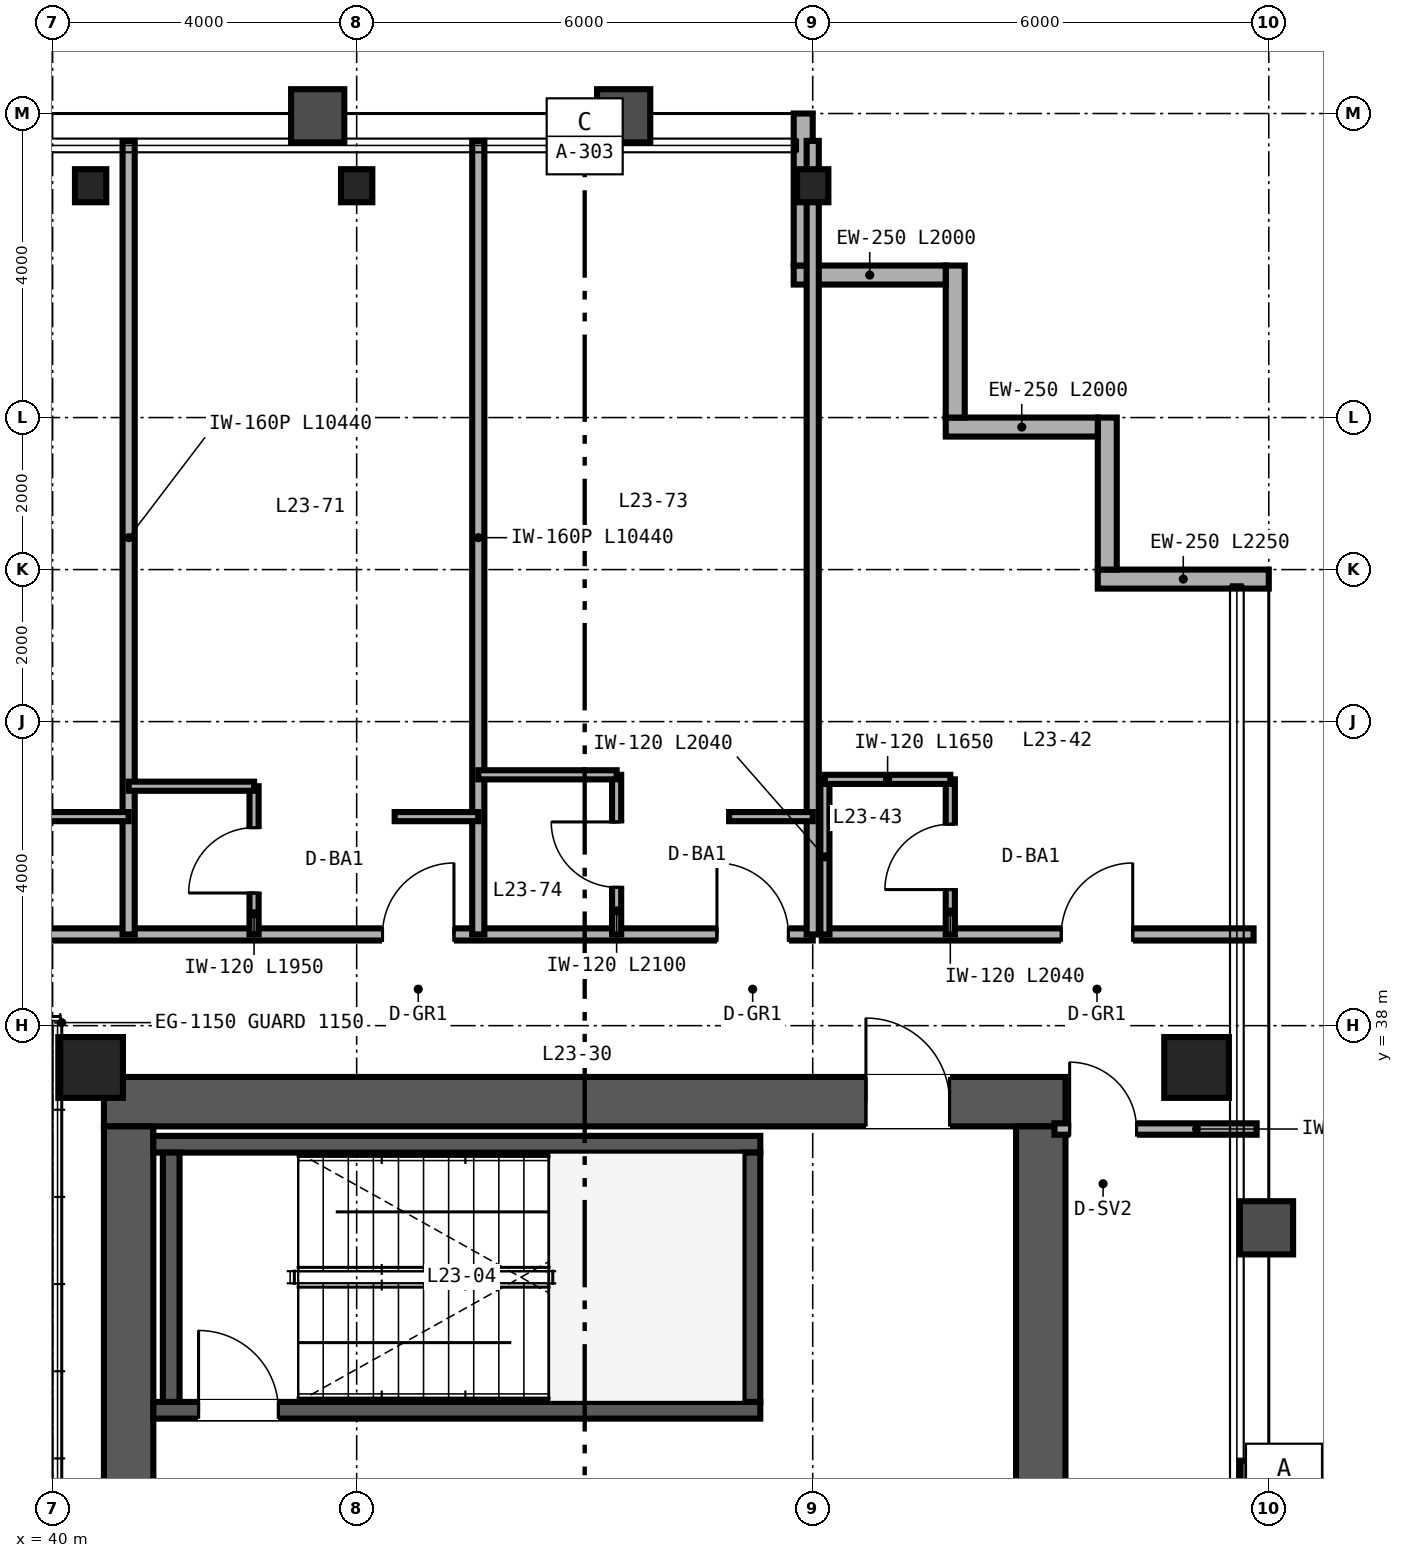
"""IFC4 building model, lengths in metres.
Left out: names, types, materials, properties, quantities, classifications, styles, units other than length and angle.
Written with IfcOpenShell. Run it as: python <this file> out.ifc"""

import sys

from ifc_helpers import new_model, si_unit, direction, frame, frame_2d, origin, origin_2d, place, context, subcontext, project, spatial, rectangle, hollow_rectangle, i_section, extrude, source, transform, mapped, element, fill, save


model = new_model("IFC4")
c1 = context("Model", 3, precision=1e-05, world=origin(), true_north=direction((0.0, 1.0)))
c2 = subcontext(c1, "Body", "Model", "MODEL_VIEW")
j1 = project(units=[si_unit("LENGTHUNIT", "METRE"), si_unit("PLANEANGLEUNIT", "RADIAN")], contexts=[c1])
p1 = place(None, origin())
s1 = spatial("IfcSite", under=j1, at=p1, CompositionType="ELEMENT")
p2 = place(p1, origin())
s2 = spatial("IfcBuilding", under=s1, at=p2, CompositionType="ELEMENT")
p3 = place(p2, frame((0.0, 0.0, 97.2)))
s3 = spatial("IfcBuildingStorey", under=s2, at=p3, CompositionType="ELEMENT", Elevation=97.2)
p4 = place(p3, frame((40.675, 37.0, 0.0), z_axis=(0.0, 0.0, 1.0), x_axis=(1.0, 0.0, 0.0)))
e1 = element("IfcWall", 1, at=p4, inside=s3, PredefinedType="SHEAR", context=c2, shape_type="SweptSolid", body=[
    extrude(rectangle(XDim=12.65, YDim=0.65, at=frame_2d((6.325, 0.0))), origin(), (0.0, 0.0, 1.0), 3.36),
])
p5 = place(p4, frame((10.025, 0.0, 0.0)))
e2 = element("IfcOpeningElement", 2, at=p5, cuts=e1, PredefinedType="OPENING", context=c2, shape_type="SweptSolid", body=[
    extrude(rectangle(XDim=1.1, YDim=2.15, at=frame_2d((0.55, 1.075))), frame((0.0, 0.335, 0.0), z_axis=(0.0, -1.0, 0.0), x_axis=(1.0, 0.0, 0.0)), (0.0, 0.0, 1.0), 0.67),
])
for number, where, z_axis, x_axis in (
    (3, (41.0, 15.325, 0.0), (0.0, 0.0, 1.0), (0.0, 1.0, 0.0)),
    (4, (53.0, 15.325, 0.0), (0.0, 0.0, 1.0), (0.0, 1.0, 0.0)),
):
    element("IfcWall", number, at=place(p3, frame(where, z_axis=z_axis, x_axis=x_axis)), inside=s3, PredefinedType="SHEAR", context=c2, shape_type="SweptSolid", body=[
        extrude(rectangle(XDim=21.35, YDim=0.65, at=frame_2d((10.675, 0.0))), origin(), (0.0, 0.0, 1.0), 3.36),
    ])
p6 = place(p3, frame((41.325, 32.94, 0.0), z_axis=(0.0, 0.0, 1.0), x_axis=(1.0, 0.0, 0.0)))
e5 = element("IfcWall", 5, at=p6, inside=s3, PredefinedType="SHEAR", context=c2, shape_type="SweptSolid", body=[
    extrude(rectangle(XDim=7.985, YDim=0.22, at=frame_2d((3.993, 0.0))), origin(), (0.0, 0.0, 1.0), 3.4),
])
p7 = place(p6, frame((0.595, 0.0, 0.0)))
e6 = element("IfcOpeningElement", 6, at=p7, cuts=e5, PredefinedType="OPENING", context=c2, shape_type="SweptSolid", body=[
    extrude(rectangle(XDim=1.05, YDim=2.15, at=frame_2d((0.525, 1.075))), frame((0.0, 0.12, 0.0), z_axis=(0.0, -1.0, 0.0), x_axis=(1.0, 0.0, 0.0)), (0.0, 0.0, 1.0), 0.24),
])
p8 = place(p3, frame((41.325, 36.44, 0.0), z_axis=(0.0, 0.0, 1.0), x_axis=(1.0, 0.0, 0.0)))
e7 = element("IfcWall", 7, at=p8, inside=s3, PredefinedType="SHEAR", context=c2, shape_type="SweptSolid", body=[
    extrude(rectangle(XDim=7.985, YDim=0.22, at=frame_2d((3.993, 0.0))), origin(), (0.0, 0.0, 1.0), 3.4),
])
for number, where, z_axis, x_axis in (
    (8, (41.56, 33.05, 0.0), (0.0, 0.0, 1.0), (0.0, 1.0, 0.0)),
    (9, (49.2, 33.05, 0.0), (0.0, 0.0, 1.0), (0.0, 1.0, 0.0)),
):
    element("IfcWall", number, at=place(p3, frame(where, z_axis=z_axis, x_axis=x_axis)), inside=s3, PredefinedType="SHEAR", context=c2, shape_type="SweptSolid", body=[
        extrude(rectangle(XDim=3.28, YDim=0.22, at=frame_2d((1.64, 0.0))), origin(), (0.0, 0.0, 1.0), 3.4),
    ])
m1 = source(origin(), c2, "Body", "SweptSolid", [
    extrude(hollow_rectangle(XDim=0.85, YDim=0.8, WallThickness=0.032, at=origin_2d()), origin(), (0.0, 0.0, 1.0), 3.36),
])
for number, where, z_axis, x_axis in (
    (10, (40.5, 37.45, 0.0), (0.0, 0.0, 1.0), (1.0, 0.0, 0.0)),
    (11, (55.05, 37.45, 0.0), (0.0, 0.0, 1.0), (1.0, 0.0, 0.0)),
):
    element("IfcColumn", number, at=place(p3, frame(where, z_axis=z_axis, x_axis=x_axis)), inside=s3, PredefinedType="COLUMN", context=c2, shape_type="MappedRepresentation", body=[
        mapped(m1, transform((0.0, 0.0, 0.0), scale=1.0)),
    ])
m2 = source(origin(), c2, "Body", "SweptSolid", [
    extrude(i_section(OverallWidth=0.412, OverallDepth=0.435, WebThickness=0.036, FlangeThickness=0.057, FilletRadius=0.025, at=origin_2d()), origin(), (0.0, 0.0, 1.0), 3.36),
])
for number, where, z_axis, x_axis in (
    (12, (40.5, 49.05, 0.0), (0.0, 0.0, 1.0), (1.0, 0.0, 0.0)),
    (13, (44.0, 49.05, 0.0), (0.0, 0.0, 1.0), (1.0, 0.0, 0.0)),
    (14, (50.0, 49.05, 0.0), (0.0, 0.0, 1.0), (1.0, 0.0, 0.0)),
):
    element("IfcColumn", number, at=place(p3, frame(where, z_axis=z_axis, x_axis=x_axis)), inside=s3, PredefinedType="COLUMN", context=c2, shape_type="MappedRepresentation", body=[
        mapped(m2, transform((0.0, 0.0, 0.0), scale=1.0)),
    ])
p9 = place(p3, frame((56.0, 43.875, 0.0), z_axis=(0.0, 0.0, 1.0), x_axis=(-1.0, 0.0, 0.0)))
e15 = element("IfcWall", 15, at=p9, inside=s3, PredefinedType="SOLIDWALL", context=c2, shape_type="SweptSolid", body=[
    extrude(rectangle(XDim=2.25, YDim=0.25, at=frame_2d((1.125, 0.0))), origin(), (0.0, 0.0, 1.0), 3.36),
])
for number, where, z_axis, x_axis in (
    (16, (53.875, 44.0, 0.0), (0.0, 0.0, 1.0), (0.0, 1.0, 0.0)),
    (17, (53.75, 45.875, 0.0), (0.0, 0.0, 1.0), (-1.0, 0.0, 0.0)),
    (18, (51.875, 46.0, 0.0), (0.0, 0.0, 1.0), (0.0, 1.0, 0.0)),
    (19, (51.75, 47.875, 0.0), (0.0, 0.0, 1.0), (-1.0, 0.0, 0.0)),
):
    element("IfcWall", number, at=place(p3, frame(where, z_axis=z_axis, x_axis=x_axis)), inside=s3, PredefinedType="SOLIDWALL", context=c2, shape_type="SweptSolid", body=[
        extrude(rectangle(XDim=2.0, YDim=0.25, at=frame_2d((1.0, 0.0))), origin(), (0.0, 0.0, 1.0), 3.36),
    ])
p10 = place(p3, frame((49.875, 48.0, 0.0), z_axis=(0.0, 0.0, 1.0), x_axis=(0.0, 1.0, 0.0)))
e20 = element("IfcWall", 20, at=p10, inside=s3, PredefinedType="SOLIDWALL", context=c2, shape_type="SweptSolid", body=[
    extrude(rectangle(XDim=2.0, YDim=0.25, at=frame_2d((1.0, 0.0))), origin(), (0.0, 0.0, 1.0), 2.667),
])
p11 = place(p3, frame((53.18, 36.64, 0.0), z_axis=(0.0, 0.0, 1.0), x_axis=(1.0, 0.0, 0.0)))
e21 = element("IfcWall", 21, at=p11, inside=s3, PredefinedType="PARTITIONING", context=c2, shape_type="SweptSolid", body=[
    extrude(rectangle(XDim=2.66, YDim=0.15, at=frame_2d((1.33, 0.0))), origin(), (0.0, 0.0, 1.0), 2.743),
])
p12 = place(p11, frame((0.2, 0.0, 0.0)))
e22 = element("IfcOpeningElement", 22, at=p12, cuts=e21, PredefinedType="OPENING", context=c2, shape_type="SweptSolid", body=[
    extrude(rectangle(XDim=0.88, YDim=2.15, at=frame_2d((0.44, 1.075))), frame((0.0, 0.085, 0.0), z_axis=(0.0, -1.0, 0.0), x_axis=(1.0, 0.0, 0.0)), (0.0, 0.0, 1.0), 0.17),
])
p13 = place(p3, frame((50.12, 39.2, 0.0), z_axis=(0.0, 0.0, 1.0), x_axis=(1.0, 0.0, 0.0)))
e23 = element("IfcWall", 23, at=p13, inside=s3, PredefinedType="PARTITIONING", context=c2, shape_type="SweptSolid", body=[
    extrude(rectangle(XDim=5.68, YDim=0.16, at=frame_2d((2.84, 0.0))), origin(), (0.0, 0.0, 1.0), 3.36),
])
p14 = place(p13, frame((3.15, 0.0, 0.0)))
e24 = element("IfcOpeningElement", 24, at=p14, cuts=e23, PredefinedType="OPENING", context=c2, shape_type="SweptSolid", body=[
    extrude(rectangle(XDim=0.94, YDim=2.15, at=frame_2d((0.47, 1.075))), frame((0.0, 0.09, 0.0), z_axis=(0.0, -1.0, 0.0), x_axis=(1.0, 0.0, 0.0)), (0.0, 0.0, 1.0), 0.18),
])
p15 = place(p3, frame((51.81, 39.2, 0.0), z_axis=(0.0, 0.0, 1.0), x_axis=(0.0, 1.0, 0.0)))
e25 = element("IfcWall", 25, at=p15, inside=s3, PredefinedType="PARTITIONING", context=c2, shape_type="SweptSolid", body=[
    extrude(rectangle(XDim=2.04, YDim=0.12, at=frame_2d((1.02, 0.0))), origin(), (0.0, 0.0, 1.0), 3.36),
])
p16 = place(p15, frame((0.59, 0.0, 0.0)))
e26 = element("IfcOpeningElement", 26, at=p16, cuts=e25, PredefinedType="OPENING", context=c2, shape_type="SweptSolid", body=[
    extrude(rectangle(XDim=0.86, YDim=2.1, at=frame_2d((0.43, 1.05))), frame((0.0, 0.07, 0.0), z_axis=(0.0, -1.0, 0.0), x_axis=(1.0, 0.0, 0.0)), (0.0, 0.0, 1.0), 0.14),
])
p17 = place(p3, frame((50.16, 39.2, 0.0), z_axis=(0.0, 0.0, 1.0), x_axis=(0.0, 1.0, 0.0)))
e27 = element("IfcWall", 27, at=p17, inside=s3, PredefinedType="PARTITIONING", context=c2, shape_type="SweptSolid", body=[
    extrude(rectangle(XDim=2.04, YDim=0.12, at=frame_2d((1.02, 0.0))), origin(), (0.0, 0.0, 1.0), 3.36),
])
p18 = place(p3, frame((50.16, 41.24, 0.0), z_axis=(0.0, 0.0, 1.0), x_axis=(1.0, 0.0, 0.0)))
e28 = element("IfcWall", 28, at=p18, inside=s3, PredefinedType="PARTITIONING", context=c2, shape_type="SweptSolid", body=[
    extrude(rectangle(XDim=1.65, YDim=0.12, at=frame_2d((0.825, 0.0))), origin(), (0.0, 0.0, 1.0), 3.36),
])
p19 = place(p3, frame((14.0, 39.2, 0.0), z_axis=(0.0, 0.0, 1.0), x_axis=(1.0, 0.0, 0.0)))
e29 = element("IfcWall", 29, at=p19, inside=s3, PredefinedType="PARTITIONING", context=c2, shape_type="SweptSolid", body=[
    extrude(rectangle(XDim=36.0, YDim=0.16, at=frame_2d((18.0, 0.0))), origin(), (0.0, 0.0, 1.0), 2.581),
])
p20 = place(p19, frame((3.94, 0.0, 0.0)))
e30 = element("IfcOpeningElement", 30, at=p20, cuts=e29, PredefinedType="OPENING", context=c2, shape_type="SweptSolid", body=[
    extrude(rectangle(XDim=0.94, YDim=2.15, at=frame_2d((0.47, 1.075))), frame((0.0, 0.09, 0.0), z_axis=(0.0, -1.0, 0.0), x_axis=(1.0, 0.0, 0.0)), (0.0, 0.0, 1.0), 0.18),
])
p21 = place(p19, frame((7.89, 0.0, 0.0)))
e31 = element("IfcOpeningElement", 31, at=p21, cuts=e29, PredefinedType="OPENING", context=c2, shape_type="SweptSolid", body=[
    extrude(rectangle(XDim=0.94, YDim=2.15, at=frame_2d((0.47, 1.075))), frame((0.0, 0.09, 0.0), z_axis=(0.0, -1.0, 0.0), x_axis=(1.0, 0.0, 0.0)), (0.0, 0.0, 1.0), 0.18),
])
p22 = place(p19, frame((14.94, 0.0, 0.0)))
e32 = element("IfcOpeningElement", 32, at=p22, cuts=e29, PredefinedType="OPENING", context=c2, shape_type="SweptSolid", body=[
    extrude(rectangle(XDim=0.94, YDim=2.15, at=frame_2d((0.47, 1.075))), frame((0.0, 0.09, 0.0), z_axis=(0.0, -1.0, 0.0), x_axis=(1.0, 0.0, 0.0)), (0.0, 0.0, 1.0), 0.18),
])
p23 = place(p19, frame((18.72, 0.0, 0.0)))
e33 = element("IfcOpeningElement", 33, at=p23, cuts=e29, PredefinedType="OPENING", context=c2, shape_type="SweptSolid", body=[
    extrude(rectangle(XDim=0.96, YDim=2.15, at=frame_2d((0.48, 1.075))), frame((0.0, 0.09, 0.0), z_axis=(0.0, -1.0, 0.0), x_axis=(1.0, 0.0, 0.0)), (0.0, 0.0, 1.0), 0.18),
])
p24 = place(p19, frame((24.79, 0.0, 0.0)))
e34 = element("IfcOpeningElement", 34, at=p24, cuts=e29, PredefinedType="OPENING", context=c2, shape_type="SweptSolid", body=[
    extrude(rectangle(XDim=0.94, YDim=2.15, at=frame_2d((0.47, 1.075))), frame((0.0, 0.09, 0.0), z_axis=(0.0, -1.0, 0.0), x_axis=(1.0, 0.0, 0.0)), (0.0, 0.0, 1.0), 0.18),
])
p25 = place(p19, frame((30.34, 0.0, 0.0)))
e35 = element("IfcOpeningElement", 35, at=p25, cuts=e29, PredefinedType="OPENING", context=c2, shape_type="SweptSolid", body=[
    extrude(rectangle(XDim=0.94, YDim=2.15, at=frame_2d((0.47, 1.075))), frame((0.0, 0.09, 0.0), z_axis=(0.0, -1.0, 0.0), x_axis=(1.0, 0.0, 0.0)), (0.0, 0.0, 1.0), 0.18),
])
p26 = place(p19, frame((34.74, 0.0, 0.0)))
e36 = element("IfcOpeningElement", 36, at=p26, cuts=e29, PredefinedType="OPENING", context=c2, shape_type="SweptSolid", body=[
    extrude(rectangle(XDim=0.94, YDim=2.15, at=frame_2d((0.47, 1.075))), frame((0.0, 0.09, 0.0), z_axis=(0.0, -1.0, 0.0), x_axis=(1.0, 0.0, 0.0)), (0.0, 0.0, 1.0), 0.18),
])
p27 = place(p3, frame((50.0, 39.2, 0.0), z_axis=(0.0, 0.0, 1.0), x_axis=(0.0, 1.0, 0.0)))
e37 = element("IfcWall", 37, at=p27, inside=s3, PredefinedType="PARTITIONING", context=c2, shape_type="SweptSolid", body=[
    extrude(rectangle(XDim=10.44, YDim=0.16, at=frame_2d((5.22, 0.0))), origin(), (0.0, 0.0, 1.0), 2.667),
])
p28 = place(p3, frame((41.0, 39.2, 0.0), z_axis=(0.0, 0.0, 1.0), x_axis=(0.0, 1.0, 0.0)))
e38 = element("IfcWall", 38, at=p28, inside=s3, PredefinedType="PARTITIONING", context=c2, shape_type="SweptSolid", body=[
    extrude(rectangle(XDim=10.44, YDim=0.16, at=frame_2d((5.22, 0.0))), origin(), (0.0, 0.0, 1.0), 2.823),
])
p29 = place(p3, frame((39.9, 40.75, 0.0), z_axis=(0.0, 0.0, 1.0), x_axis=(1.0, 0.0, 0.0)))
e39 = element("IfcWall", 39, at=p29, inside=s3, PredefinedType="PARTITIONING", context=c2, shape_type="SweptSolid", body=[
    extrude(rectangle(XDim=1.1, YDim=0.12, at=frame_2d((0.55, 0.0))), origin(), (0.0, 0.0, 1.0), 2.581),
])
p30 = place(p3, frame((45.6, 39.2, 0.0), z_axis=(0.0, 0.0, 1.0), x_axis=(0.0, 1.0, 0.0)))
e40 = element("IfcWall", 40, at=p30, inside=s3, PredefinedType="PARTITIONING", context=c2, shape_type="SweptSolid", body=[
    extrude(rectangle(XDim=10.44, YDim=0.16, at=frame_2d((5.22, 0.0))), origin(), (0.0, 0.0, 1.0), 2.667),
])
p31 = place(p3, frame((42.65, 39.2, 0.0), z_axis=(0.0, 0.0, 1.0), x_axis=(0.0, 1.0, 0.0)))
e41 = element("IfcWall", 41, at=p31, inside=s3, PredefinedType="PARTITIONING", context=c2, shape_type="SweptSolid", body=[
    extrude(rectangle(XDim=1.95, YDim=0.12, at=frame_2d((0.975, 0.0))), origin(), (0.0, 0.0, 1.0), 3.36),
])
p32 = place(p31, frame((0.545, 0.0, 0.0)))
e42 = element("IfcOpeningElement", 42, at=p32, cuts=e41, PredefinedType="OPENING", context=c2, shape_type="SweptSolid", body=[
    extrude(rectangle(XDim=0.86, YDim=2.1, at=frame_2d((0.43, 1.05))), frame((0.0, 0.07, 0.0), z_axis=(0.0, -1.0, 0.0), x_axis=(1.0, 0.0, 0.0)), (0.0, 0.0, 1.0), 0.14),
])
p33 = place(p3, frame((41.0, 41.15, 0.0), z_axis=(0.0, 0.0, 1.0), x_axis=(1.0, 0.0, 0.0)))
e43 = element("IfcWall", 43, at=p33, inside=s3, PredefinedType="PARTITIONING", context=c2, shape_type="SweptSolid", body=[
    extrude(rectangle(XDim=1.65, YDim=0.12, at=frame_2d((0.825, 0.0))), origin(), (0.0, 0.0, 1.0), 3.36),
])
p34 = place(p3, frame((44.5, 40.75, 0.0), z_axis=(0.0, 0.0, 1.0), x_axis=(1.0, 0.0, 0.0)))
e44 = element("IfcWall", 44, at=p34, inside=s3, PredefinedType="PARTITIONING", context=c2, shape_type="SweptSolid", body=[
    extrude(rectangle(XDim=1.1, YDim=0.12, at=frame_2d((0.55, 0.0))), origin(), (0.0, 0.0, 1.0), 3.36),
])
p35 = place(p3, frame((47.42, 39.2, 0.0), z_axis=(0.0, 0.0, 1.0), x_axis=(0.0, 1.0, 0.0)))
e45 = element("IfcWall", 45, at=p35, inside=s3, PredefinedType="PARTITIONING", context=c2, shape_type="SweptSolid", body=[
    extrude(rectangle(XDim=2.1, YDim=0.12, at=frame_2d((1.05, 0.0))), origin(), (0.0, 0.0, 1.0), 3.36),
])
p36 = place(p35, frame((0.62, 0.0, 0.0)))
e46 = element("IfcOpeningElement", 46, at=p36, cuts=e45, PredefinedType="OPENING", context=c2, shape_type="SweptSolid", body=[
    extrude(rectangle(XDim=0.86, YDim=2.1, at=frame_2d((0.43, 1.05))), frame((0.0, 0.07, 0.0), z_axis=(0.0, -1.0, 0.0), x_axis=(1.0, 0.0, 0.0)), (0.0, 0.0, 1.0), 0.14),
])
p37 = place(p3, frame((45.6, 41.3, 0.0), z_axis=(0.0, 0.0, 1.0), x_axis=(1.0, 0.0, 0.0)))
e47 = element("IfcWall", 47, at=p37, inside=s3, PredefinedType="PARTITIONING", context=c2, shape_type="SweptSolid", body=[
    extrude(rectangle(XDim=1.82, YDim=0.12, at=frame_2d((0.91, 0.0))), origin(), (0.0, 0.0, 1.0), 3.36),
])
p38 = place(p3, frame((48.9, 40.75, 0.0), z_axis=(0.0, 0.0, 1.0), x_axis=(1.0, 0.0, 0.0)))
e48 = element("IfcWall", 48, at=p38, inside=s3, PredefinedType="PARTITIONING", context=c2, shape_type="SweptSolid", body=[
    extrude(rectangle(XDim=1.1, YDim=0.12, at=frame_2d((0.55, 0.0))), origin(), (0.0, 0.0, 1.0), 3.36),
])
m3 = source(origin(), c2, "Body", "SweptSolid", [
    extrude(rectangle(XDim=1.05, YDim=2.15, at=frame_2d((0.525, 1.075))), frame((0.0, 0.025, 0.0), z_axis=(0.0, -1.0, 0.0), x_axis=(1.0, 0.0, 0.0)), (0.0, 0.0, 1.0), 0.05),
])
p39 = place(p7, origin())
e49 = element("IfcDoor", 49, at=p39, inside=s3, OperationType="SINGLE_SWING_LEFT", PredefinedType="DOOR", context=c2, shape_type="MappedRepresentation", body=[
    mapped(m3, transform((0.0, 0.0, 0.0), scale=1.0)),
])
fill(e6, e49)
m4 = source(origin(), c2, "Body", "SweptSolid", [
    extrude(rectangle(XDim=1.1, YDim=2.15, at=frame_2d((0.55, 1.075))), frame((0.0, 0.025, 0.0), z_axis=(0.0, -1.0, 0.0), x_axis=(1.0, 0.0, 0.0)), (0.0, 0.0, 1.0), 0.05),
])
p40 = place(p5, origin())
e50 = element("IfcDoor", 50, at=p40, inside=s3, OperationType="SINGLE_SWING_LEFT", PredefinedType="DOOR", context=c2, shape_type="MappedRepresentation", body=[
    mapped(m4, transform((0.0, 0.0, 0.0), scale=1.0)),
])
fill(e2, e50)
m5 = source(origin(), c2, "Body", "SweptSolid", [
    extrude(rectangle(XDim=0.88, YDim=2.15, at=frame_2d((0.44, 1.075))), frame((0.0, 0.025, 0.0), z_axis=(0.0, -1.0, 0.0), x_axis=(1.0, 0.0, 0.0)), (0.0, 0.0, 1.0), 0.05),
])
p41 = place(p12, origin())
e51 = element("IfcDoor", 51, at=p41, inside=s3, OperationType="SINGLE_SWING_LEFT", PredefinedType="DOOR", context=c2, shape_type="MappedRepresentation", body=[
    mapped(m5, transform((0.0, 0.0, 0.0), scale=1.0)),
])
fill(e22, e51)
m6 = source(origin(), c2, "Body", "SweptSolid", [
    extrude(rectangle(XDim=0.86, YDim=2.1, at=frame_2d((0.43, 1.05))), frame((0.0, 0.025, 0.0), z_axis=(0.0, -1.0, 0.0), x_axis=(1.0, 0.0, 0.0)), (0.0, 0.0, 1.0), 0.05),
])
p42 = place(p16, origin())
e52 = element("IfcDoor", 52, at=p42, inside=s3, OperationType="SINGLE_SWING_LEFT", PredefinedType="DOOR", context=c2, shape_type="MappedRepresentation", body=[
    mapped(m6, transform((0.0, 0.0, 0.0), scale=1.0)),
])
fill(e26, e52)
m7 = source(origin(), c2, "Body", "SweptSolid", [
    extrude(rectangle(XDim=0.94, YDim=2.15, at=frame_2d((0.47, 1.075))), frame((0.0, 0.025, 0.0), z_axis=(0.0, -1.0, 0.0), x_axis=(1.0, 0.0, 0.0)), (0.0, 0.0, 1.0), 0.05),
])
p43 = place(p14, origin())
e53 = element("IfcDoor", 53, at=p43, inside=s3, OperationType="SINGLE_SWING_RIGHT", PredefinedType="DOOR", context=c2, shape_type="MappedRepresentation", body=[
    mapped(m7, transform((0.0, 0.0, 0.0), scale=1.0)),
])
fill(e24, e53)
p44 = place(p32, origin())
e54 = element("IfcDoor", 54, at=p44, inside=s3, OperationType="SINGLE_SWING_LEFT", PredefinedType="DOOR", context=c2, shape_type="MappedRepresentation", body=[
    mapped(m6, transform((0.0, 0.0, 0.0), scale=1.0)),
])
fill(e42, e54)
p45 = place(p36, origin())
e55 = element("IfcDoor", 55, at=p45, inside=s3, OperationType="SINGLE_SWING_RIGHT", PredefinedType="DOOR", context=c2, shape_type="MappedRepresentation", body=[
    mapped(m6, transform((0.0, 0.0, 0.0), scale=1.0)),
])
fill(e46, e55)
p46 = place(p25, origin())
e56 = element("IfcDoor", 56, at=p46, inside=s3, OperationType="SINGLE_SWING_RIGHT", PredefinedType="DOOR", context=c2, shape_type="MappedRepresentation", body=[
    mapped(m7, transform((0.0, 0.0, 0.0), scale=1.0)),
])
fill(e35, e56)
p47 = place(p26, origin())
e57 = element("IfcDoor", 57, at=p47, inside=s3, OperationType="SINGLE_SWING_LEFT", PredefinedType="DOOR", context=c2, shape_type="MappedRepresentation", body=[
    mapped(m7, transform((0.0, 0.0, 0.0), scale=1.0)),
])
fill(e36, e57)
save(model, sys.argv[1])
